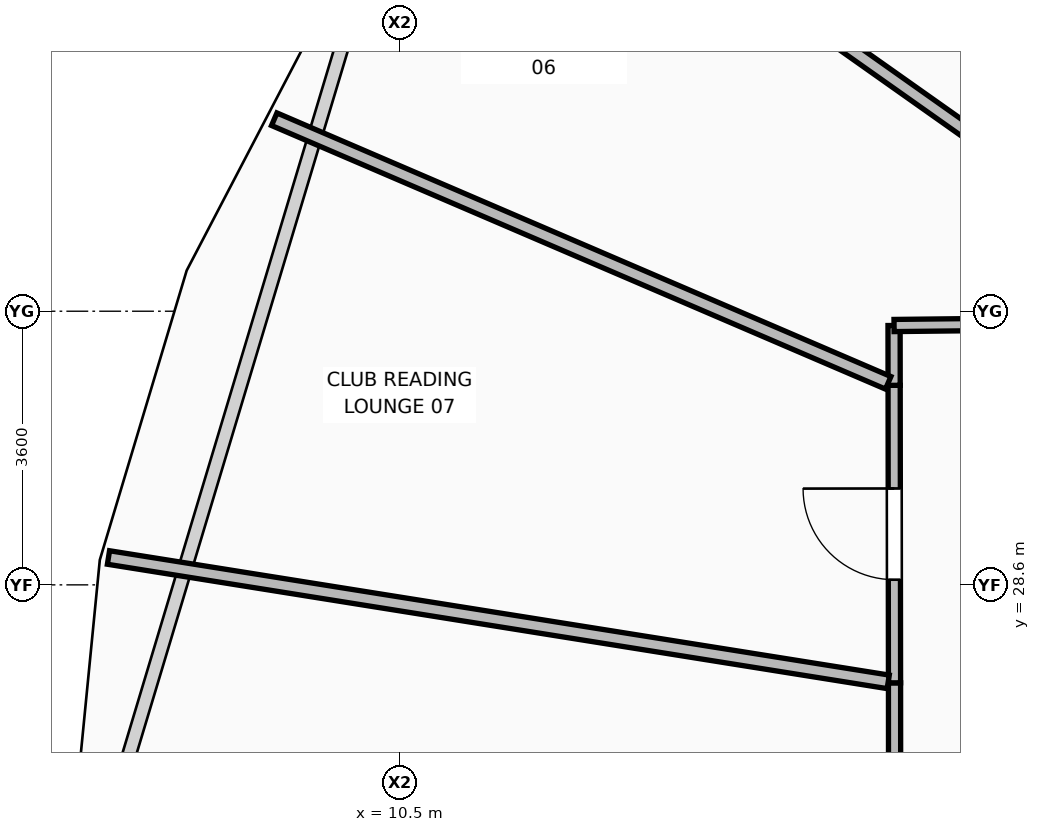
"""IFC4 building model, lengths in metres.
Left out: names, types, materials, properties, quantities, classifications, styles, units other than length and angle.
Written with IfcOpenShell. Run it as: python <this file> out.ifc"""

import sys

from ifc_helpers import new_model, si_unit, direction, frame, frame_2d, origin, place, context, subcontext, project, spatial, rectangle, extrude, element, fill, save


model = new_model("IFC4")
c1 = context("Model", 3, precision=1e-05, world=origin(), true_north=direction((0.0, 1.0)))
c2 = subcontext(c1, "Body", "Model", "MODEL_VIEW")
j1 = project(units=[si_unit("LENGTHUNIT", "METRE"), si_unit("PLANEANGLEUNIT", "RADIAN")], contexts=[c1])
p1 = place(None, origin())
s1 = spatial("IfcSite", under=j1, at=p1, CompositionType="ELEMENT")
p2 = place(p1, origin())
s2 = spatial("IfcBuilding", under=s1, at=p2, CompositionType="ELEMENT")
p3 = place(p2, frame((0.0, 0.0, 157.2)))
s3 = spatial("IfcBuildingStorey", under=s2, at=p3, CompositionType="ELEMENT", Elevation=157.2)
p4 = place(p3, frame((17.009, 26.125, 0.0), z_axis=(0.0, 0.0, 1.0), x_axis=(-0.00082338383, 0.999999661019, 0.0)))
e1 = element("IfcWall", 1, at=p4, inside=s3, PredefinedType="PARTITIONING", context=c2, shape_type="SweptSolid", body=[
    extrude(rectangle(XDim=1.186, YDim=0.16, at=frame_2d((0.593, 0.0))), origin(), (0.0, 0.0, 1.0), 3.55),
])
p5 = place(p3, frame((17.008, 27.311, 0.0), z_axis=(0.0, 0.0, 1.0), x_axis=(-0.001309879116, 0.999999142108, 0.0)))
e2 = element("IfcWall", 2, at=p5, inside=s3, PredefinedType="PARTITIONING", context=c2, shape_type="SweptSolid", body=[
    extrude(rectangle(XDim=3.914, YDim=0.16, at=frame_2d((1.957, 0.0))), origin(), (0.0, 0.0, 1.0), 3.55),
])
p6 = place(p5, frame((1.357, 0.0, 0.0)))
e3 = element("IfcOpeningElement", 3, at=p6, cuts=e2, PredefinedType="OPENING", context=c2, shape_type="SweptSolid", body=[
    extrude(rectangle(XDim=1.2, YDim=2.1, at=frame_2d((0.6, 1.05))), frame((0.0, 0.09, 0.0), z_axis=(0.0, -1.0, 0.0), x_axis=(1.0, 0.0, 0.0)), (0.0, 0.0, 1.0), 0.18),
])
p7 = place(p3, frame((17.003, 31.225, 0.0), z_axis=(0.0, 0.0, 1.0), x_axis=(-0.001241078784, 0.999999229861, 0.0)))
e4 = element("IfcWall", 4, at=p7, inside=s3, PredefinedType="PARTITIONING", context=c2, shape_type="SweptSolid", body=[
    extrude(rectangle(XDim=0.787, YDim=0.16, at=frame_2d((0.394, 0.0))), origin(), (0.0, 0.0, 1.0), 3.55),
])
p8 = place(p3, frame((17.002, 32.012, 0.0), z_axis=(0.0, 0.0, 1.0), x_axis=(0.999938574393, 0.011083656487, 0.0)))
e5 = element("IfcWall", 5, at=p8, inside=s3, PredefinedType="PARTITIONING", context=c2, shape_type="SweptSolid", body=[
    extrude(rectangle(XDim=2.533, YDim=0.16, at=frame_2d((1.267, 0.0))), origin(), (0.0, 0.0, 1.0), 3.55),
])
p9 = place(p8, frame((1.173, 0.0, 0.0)))
e6 = element("IfcOpeningElement", 6, at=p9, cuts=e5, PredefinedType="OPENING", context=c2, shape_type="SweptSolid", body=[
    extrude(rectangle(XDim=1.2, YDim=2.1, at=frame_2d((0.6, 1.05))), frame((0.0, 0.09, 0.0), z_axis=(0.0, -1.0, 0.0), x_axis=(1.0, 0.0, 0.0)), (0.0, 0.0, 1.0), 0.18),
])
p10 = place(p3, frame((19.46, 33.506, 0.0), z_axis=(0.0, 0.0, 1.0), x_axis=(-0.816788462003, 0.576937265513, 0.0)))
e7 = element("IfcWall", 7, at=p10, inside=s3, PredefinedType="PARTITIONING", context=c2, shape_type="SweptSolid", body=[
    extrude(rectangle(XDim=9.431, YDim=0.18, at=frame_2d((4.715, 0.0))), origin(), (0.0, 0.0, 1.0), 2.852),
])
p11 = place(p3, frame((16.925, 31.258, 0.0), z_axis=(0.0, 0.0, 1.0), x_axis=(-0.918899218309, 0.394492365694, 0.0)))
e8 = element("IfcWall", 8, at=p11, inside=s3, PredefinedType="PARTITIONING", context=c2, shape_type="SweptSolid", body=[
    extrude(rectangle(XDim=8.791, YDim=0.18, at=frame_2d((4.396, 0.0))), origin(), (0.0, 0.0, 1.0), 2.852),
])
p12 = place(p3, frame((16.925, 27.324, 0.0), z_axis=(0.0, 0.0, 1.0), x_axis=(-0.987522476436, 0.157478120811, 0.0)))
e9 = element("IfcWall", 9, at=p12, inside=s3, PredefinedType="PARTITIONING", context=c2, shape_type="SweptSolid", body=[
    extrude(rectangle(XDim=10.389, YDim=0.18, at=frame_2d((5.194, 0.0))), origin(), (0.0, 0.0, 1.0), 2.852),
])
p13 = place(p6, origin())
e10 = element("IfcDoor", 10, at=p13, inside=s3, OperationType="SINGLE_SWING_RIGHT", PredefinedType="DOOR", context=c2, shape_type="SweptSolid", body=[
    extrude(rectangle(XDim=1.2, YDim=2.1, at=frame_2d((0.6, 1.05))), frame((0.0, 0.025, 0.0), z_axis=(0.0, -1.0, 0.0), x_axis=(1.0, 0.0, 0.0)), (0.0, 0.0, 1.0), 0.05),
])
fill(e3, e10)
save(model, sys.argv[1])
